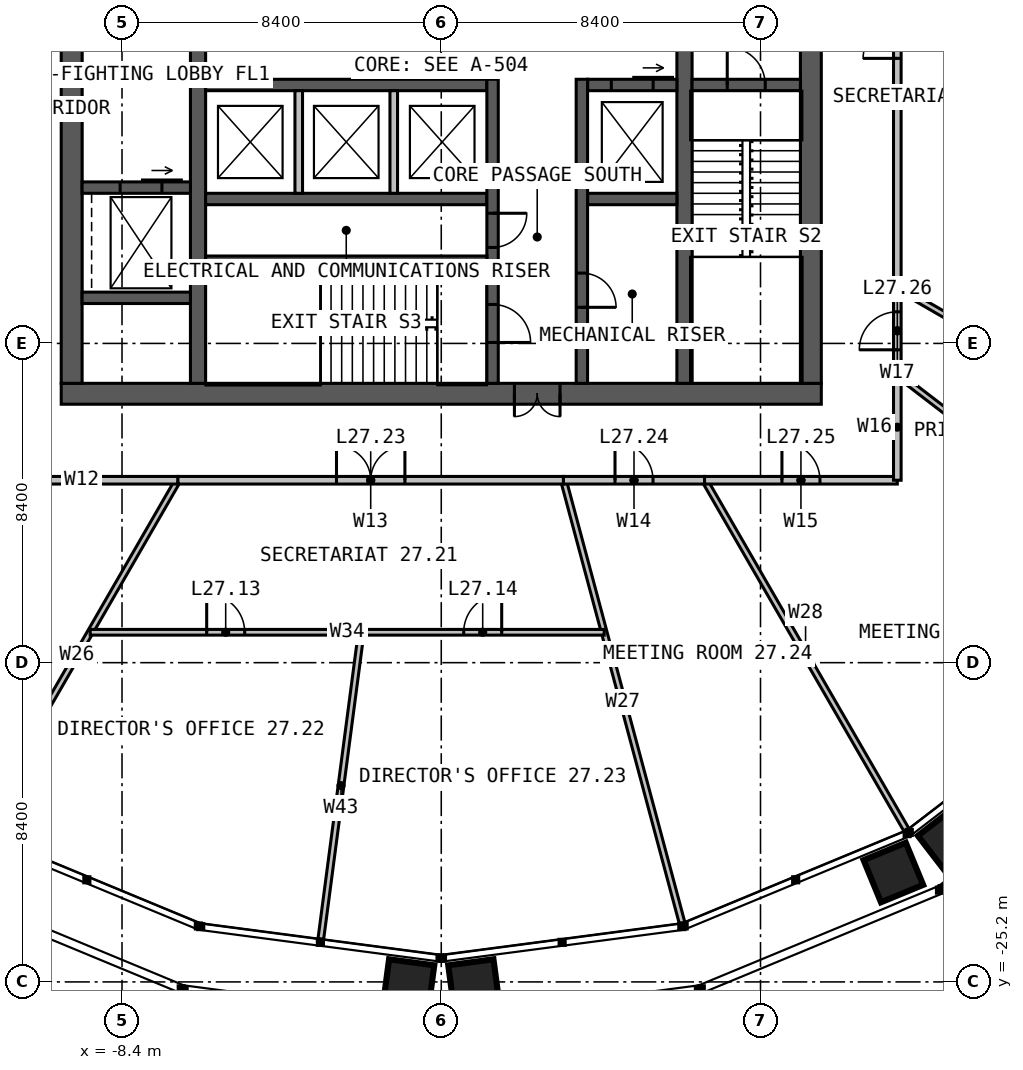
"""IFC4 building model, lengths in metres.
Left out: names, types, materials, properties, quantities, classifications, styles, units other than length and angle.
Written with IfcOpenShell. Run it as: python <this file> out.ifc"""

import sys

from ifc_helpers import new_model, si_unit, direction, frame, frame_2d, origin, place, context, subcontext, project, spatial, rectangle, extrude, element, fill, save


model = new_model("IFC4")
c1 = context("Model", 3, precision=1e-05, world=origin(), true_north=direction((0.0, 1.0)))
c2 = subcontext(c1, "Body", "Model", "MODEL_VIEW")
j1 = project(units=[si_unit("LENGTHUNIT", "METRE"), si_unit("PLANEANGLEUNIT", "RADIAN")], contexts=[c1])
p1 = place(None, origin())
s1 = spatial("IfcSite", under=j1, at=p1, CompositionType="ELEMENT")
p2 = place(p1, origin())
s2 = spatial("IfcBuilding", under=s1, at=p2, CompositionType="ELEMENT")
p3 = place(p2, frame((0.0, 0.0, 114.0)))
s3 = spatial("IfcBuildingStorey", under=s2, at=p3, CompositionType="ELEMENT", Elevation=114.0)
p4 = place(p3, frame((10.0, -9.725, 0.0), z_axis=(0.0, 0.0, 1.0), x_axis=(-1.0, 0.0, 0.0)))
e1 = element("IfcWall", 1, at=p4, inside=s3, PredefinedType="SOLIDWALL", context=c2, shape_type="SweptSolid", body=[
    extrude(rectangle(XDim=20.0, YDim=0.55, at=frame_2d((10.0, 0.0))), origin(), (0.0, 0.0, 1.0), 4.0),
])
p5 = place(p4, frame((6.875, 0.0, 0.0)))
e2 = element("IfcOpeningElement", 2, at=p5, cuts=e1, PredefinedType="OPENING", context=c2, shape_type="SweptSolid", body=[
    extrude(rectangle(XDim=1.2, YDim=2.2, at=frame_2d((0.6, 1.1))), frame((0.0, 0.285, 0.0), z_axis=(0.0, -1.0, 0.0), x_axis=(1.0, 0.0, 0.0)), (0.0, 0.0, 1.0), 0.57),
])
for number, where, z_axis, x_axis in (
    (3, (9.725, -9.45, 0.0), (0.0, 0.0, 1.0), (0.0, 1.0, 0.0)),
    (4, (-9.725, 9.45, 0.0), (0.0, 0.0, 1.0), (0.0, -1.0, 0.0)),
):
    element("IfcWall", number, at=place(p3, frame(where, z_axis=z_axis, x_axis=x_axis)), inside=s3, PredefinedType="SOLIDWALL", context=c2, shape_type="SweptSolid", body=[
        extrude(rectangle(XDim=18.9, YDim=0.55, at=frame_2d((9.45, 0.0))), origin(), (0.0, 0.0, 1.0), 4.0),
    ])
p6 = place(p3, frame((-6.4, -9.45, 0.0), z_axis=(0.0, 0.0, 1.0), x_axis=(0.0, 1.0, 0.0)))
e5 = element("IfcWall", 5, at=p6, inside=s3, PredefinedType="SOLIDWALL", context=c2, shape_type="SweptSolid", body=[
    extrude(rectangle(XDim=18.9, YDim=0.4, at=frame_2d((9.45, 0.0))), origin(), (0.0, 0.0, 1.0), 4.0),
])
p7 = place(p6, frame((8.95, 0.0, 0.0)))
e6 = element("IfcOpeningElement", 6, at=p7, cuts=e5, PredefinedType="OPENING", context=c2, shape_type="SweptSolid", body=[
    extrude(rectangle(XDim=1.0, YDim=2.2, at=frame_2d((0.5, 1.1))), frame((0.0, 0.21, 0.0), z_axis=(0.0, -1.0, 0.0), x_axis=(1.0, 0.0, 0.0)), (0.0, 0.0, 1.0), 0.42),
])
p8 = place(p3, frame((6.4, 9.45, 0.0), z_axis=(0.0, 0.0, 1.0), x_axis=(0.0, -1.0, 0.0)))
e7 = element("IfcWall", 7, at=p8, inside=s3, PredefinedType="SOLIDWALL", context=c2, shape_type="SweptSolid", body=[
    extrude(rectangle(XDim=18.9, YDim=0.4, at=frame_2d((9.45, 0.0))), origin(), (0.0, 0.0, 1.0), 4.0),
])
p9 = place(p8, frame((8.95, 0.0, 0.0)))
e8 = element("IfcOpeningElement", 8, at=p9, cuts=e7, PredefinedType="OPENING", context=c2, shape_type="SweptSolid", body=[
    extrude(rectangle(XDim=1.0, YDim=2.2, at=frame_2d((0.5, 1.1))), frame((0.0, 0.21, 0.0), z_axis=(0.0, -1.0, 0.0), x_axis=(1.0, 0.0, 0.0)), (0.0, 0.0, 1.0), 0.42),
])
p10 = place(p3, frame((-6.2, -1.6, 0.0), z_axis=(0.0, 0.0, 1.0), x_axis=(1.0, 0.0, 0.0)))
e9 = element("IfcWall", 9, at=p10, inside=s3, PredefinedType="SOLIDWALL", context=c2, shape_type="SweptSolid", body=[
    extrude(rectangle(XDim=7.4, YDim=0.3, at=frame_2d((3.7, 0.0))), origin(), (0.0, 0.0, 1.0), 4.0),
])
p11 = place(p3, frame((3.85, -1.6, 0.0), z_axis=(0.0, 0.0, 1.0), x_axis=(1.0, 0.0, 0.0)))
e10 = element("IfcWall", 10, at=p11, inside=s3, PredefinedType="SOLIDWALL", context=c2, shape_type="SweptSolid", body=[
    extrude(rectangle(XDim=2.35, YDim=0.3, at=frame_2d((1.175, 0.0))), origin(), (0.0, 0.0, 1.0), 4.0),
])
p12 = place(p11, frame((0.625, 0.0, 0.0)))
e11 = element("IfcOpeningElement", 11, at=p12, cuts=e10, PredefinedType="OPENING", context=c2, shape_type="SweptSolid", body=[
    extrude(rectangle(XDim=1.1, YDim=2.2, at=frame_2d((0.55, 1.1))), frame((0.0, 0.16, 0.0), z_axis=(0.0, -1.0, 0.0), x_axis=(1.0, 0.0, 0.0)), (0.0, 0.0, 1.0), 0.32),
])
p13 = place(p3, frame((-6.2, -4.6, 0.0), z_axis=(0.0, 0.0, 1.0), x_axis=(1.0, 0.0, 0.0)))
e12 = element("IfcWall", 12, at=p13, inside=s3, PredefinedType="SOLIDWALL", context=c2, shape_type="SweptSolid", body=[
    extrude(rectangle(XDim=7.4, YDim=0.3, at=frame_2d((3.7, 0.0))), origin(), (0.0, 0.0, 1.0), 4.0),
])
p14 = place(p3, frame((3.85, -4.6, 0.0), z_axis=(0.0, 0.0, 1.0), x_axis=(1.0, 0.0, 0.0)))
e13 = element("IfcWall", 13, at=p14, inside=s3, PredefinedType="SOLIDWALL", context=c2, shape_type="SweptSolid", body=[
    extrude(rectangle(XDim=2.35, YDim=0.3, at=frame_2d((1.175, 0.0))), origin(), (0.0, 0.0, 1.0), 4.0),
])
p15 = place(p3, frame((1.35, -1.45, 0.0), z_axis=(0.0, 0.0, 1.0), x_axis=(0.0, -1.0, 0.0)))
e14 = element("IfcWall", 14, at=p15, inside=s3, PredefinedType="SOLIDWALL", context=c2, shape_type="SweptSolid", body=[
    extrude(rectangle(XDim=8.0, YDim=0.3, at=frame_2d((4.0, 0.0))), origin(), (0.0, 0.0, 1.0), 4.0),
])
p16 = place(p15, frame((5.925, 0.0, 0.0)))
e15 = element("IfcOpeningElement", 15, at=p16, cuts=e14, PredefinedType="OPENING", context=c2, shape_type="SweptSolid", body=[
    extrude(rectangle(XDim=1.0, YDim=2.2, at=frame_2d((0.5, 1.1))), frame((0.0, 0.16, 0.0), z_axis=(0.0, -1.0, 0.0), x_axis=(1.0, 0.0, 0.0)), (0.0, 0.0, 1.0), 0.32),
])
p17 = place(p15, frame((3.525, 0.0, 0.0)))
e16 = element("IfcOpeningElement", 16, at=p17, cuts=e14, PredefinedType="OPENING", context=c2, shape_type="SweptSolid", body=[
    extrude(rectangle(XDim=0.9, YDim=2.2, at=frame_2d((0.45, 1.1))), frame((0.0, 0.16, 0.0), z_axis=(0.0, -1.0, 0.0), x_axis=(1.0, 0.0, 0.0)), (0.0, 0.0, 1.0), 0.32),
])
p18 = place(p3, frame((3.7, -1.45, 0.0), z_axis=(0.0, 0.0, 1.0), x_axis=(0.0, -1.0, 0.0)))
e17 = element("IfcWall", 17, at=p18, inside=s3, PredefinedType="SOLIDWALL", context=c2, shape_type="SweptSolid", body=[
    extrude(rectangle(XDim=8.0, YDim=0.3, at=frame_2d((4.0, 0.0))), origin(), (0.0, 0.0, 1.0), 4.0),
])
p19 = place(p18, frame((5.1, 0.0, 0.0)))
e18 = element("IfcOpeningElement", 18, at=p19, cuts=e17, PredefinedType="OPENING", context=c2, shape_type="SweptSolid", body=[
    extrude(rectangle(XDim=0.9, YDim=2.2, at=frame_2d((0.45, 1.1))), frame((0.0, 0.16, 0.0), z_axis=(0.0, -1.0, 0.0), x_axis=(1.0, 0.0, 0.0)), (0.0, 0.0, 1.0), 0.32),
])
p20 = place(p3, frame((-6.2, -6.2, 0.0), z_axis=(0.0, 0.0, 1.0), x_axis=(1.0, 0.0, 0.0)))
e19 = element("IfcWall", 19, at=p20, inside=s3, PredefinedType="SOLIDWALL", context=c2, shape_type="SweptSolid", body=[
    extrude(rectangle(XDim=7.4, YDim=0.2, at=frame_2d((3.7, 0.0))), origin(), (0.0, 0.0, 1.0), 4.0),
])
p21 = place(p3, frame((6.6, -1.6, 0.0), z_axis=(0.0, 0.0, 1.0), x_axis=(1.0, 0.0, 0.0)))
e20 = element("IfcWall", 20, at=p21, inside=s3, PredefinedType="SOLIDWALL", context=c2, shape_type="SweptSolid", body=[
    extrude(rectangle(XDim=2.85, YDim=0.3, at=frame_2d((1.425, 0.0))), origin(), (0.0, 0.0, 1.0), 4.0),
])
p22 = place(p21, frame((0.925, 0.0, 0.0)))
e21 = element("IfcOpeningElement", 21, at=p22, cuts=e20, PredefinedType="OPENING", context=c2, shape_type="SweptSolid", body=[
    extrude(rectangle(XDim=1.0, YDim=2.2, at=frame_2d((0.5, 1.1))), frame((0.0, 0.16, 0.0), z_axis=(0.0, -1.0, 0.0), x_axis=(1.0, 0.0, 0.0)), (0.0, 0.0, 1.0), 0.32),
])
p23 = place(p3, frame((-9.45, -4.3, 0.0), z_axis=(0.0, 0.0, 1.0), x_axis=(1.0, 0.0, 0.0)))
e22 = element("IfcWall", 22, at=p23, inside=s3, PredefinedType="SOLIDWALL", context=c2, shape_type="SweptSolid", body=[
    extrude(rectangle(XDim=2.85, YDim=0.3, at=frame_2d((1.425, 0.0))), origin(), (0.0, 0.0, 1.0), 4.0),
])
p24 = place(p23, frame((1.0, 0.0, 0.0)))
e23 = element("IfcOpeningElement", 23, at=p24, cuts=e22, PredefinedType="OPENING", context=c2, shape_type="SweptSolid", body=[
    extrude(rectangle(XDim=1.1, YDim=2.2, at=frame_2d((0.55, 1.1))), frame((0.0, 0.16, 0.0), z_axis=(0.0, -1.0, 0.0), x_axis=(1.0, 0.0, 0.0)), (0.0, 0.0, 1.0), 0.32),
])
p25 = place(p3, frame((-9.45, -7.2, 0.0), z_axis=(0.0, 0.0, 1.0), x_axis=(1.0, 0.0, 0.0)))
e24 = element("IfcWall", 24, at=p25, inside=s3, PredefinedType="SOLIDWALL", context=c2, shape_type="SweptSolid", body=[
    extrude(rectangle(XDim=2.85, YDim=0.3, at=frame_2d((1.425, 0.0))), origin(), (0.0, 0.0, 1.0), 4.0),
])
for number, where, z_axis, x_axis in (
    (25, (-3.75, -1.75, 0.0), (0.0, 0.0, 1.0), (0.0, -1.0, 0.0)),
    (26, (-1.25, -1.75, 0.0), (0.0, 0.0, 1.0), (0.0, -1.0, 0.0)),
):
    element("IfcWall", number, at=place(p3, frame(where, z_axis=z_axis, x_axis=x_axis)), inside=s3, PredefinedType="SOLIDWALL", context=c2, shape_type="SweptSolid", body=[
        extrude(rectangle(XDim=2.7, YDim=0.2, at=frame_2d((1.35, 0.0))), origin(), (0.0, 0.0, 1.0), 3.75),
    ])
for number, where, z_axis, x_axis in (
    (27, (12.0, -6.928, 0.0), (0.0, 0.0, 1.0), (0.866, -0.5, 0.0)),
    (28, (-6.928, -12.0, 0.0), (0.0, 0.0, 1.0), (-0.5, -0.866, 0.0)),
):
    element("IfcWall", number, at=place(p3, frame(where, z_axis=z_axis, x_axis=x_axis)), inside=s3, PredefinedType="PARTITIONING", context=c2, shape_type="SweptSolid", body=[
        extrude(rectangle(XDim=10.631, YDim=0.15, at=frame_2d((5.315, 0.0))), origin(), (0.0, 0.0, 1.0), 2.79),
    ])
p26 = place(p3, frame((3.215, -12.0, 0.0), z_axis=(0.0, 0.0, 1.0), x_axis=(0.258814986396, -0.965926913807, 0.0)))
e29 = element("IfcWall", 29, at=p26, inside=s3, PredefinedType="PARTITIONING", context=c2, shape_type="SweptSolid", body=[
    extrude(rectangle(XDim=12.064, YDim=0.15, at=frame_2d((6.032, 0.0))), origin(), (0.0, 0.0, 1.0), 2.79),
])
p27 = place(p3, frame((6.928, -12.0, 0.0), z_axis=(0.0, 0.0, 1.0), x_axis=(0.500002090115, -0.866024197053, 0.0)))
e30 = element("IfcWall", 30, at=p27, inside=s3, PredefinedType="PARTITIONING", context=c2, shape_type="SweptSolid", body=[
    extrude(rectangle(XDim=10.631, YDim=0.15, at=frame_2d((5.315, 0.0))), origin(), (0.0, 0.0, 1.0), 2.79),
])
p28 = place(p3, frame((12.0, -9.208, 0.0), z_axis=(0.0, 0.0, 1.0), x_axis=(0.793357264949, -0.608756314261, 0.0)))
e31 = element("IfcWall", 31, at=p28, inside=s3, PredefinedType="PARTITIONING", context=c2, shape_type="SweptSolid", body=[
    extrude(rectangle(XDim=9.152, YDim=0.15, at=frame_2d((4.576, 0.0))), origin(), (0.0, 0.0, 1.0), 2.79),
])
p29 = place(p3, frame((12.0, -6.928, 0.0), z_axis=(0.0, 0.0, 1.0), x_axis=(0.0, 1.0, 0.0)))
e32 = element("IfcWall", 32, at=p29, inside=s3, PredefinedType="PARTITIONING", context=c2, shape_type="SweptSolid", body=[
    extrude(rectangle(XDim=13.856, YDim=0.2, at=frame_2d((6.928, 0.0))), origin(), (0.0, 0.0, 1.0), 3.8),
])
p30 = place(p29, frame((6.028, 0.0, 0.0)))
e33 = element("IfcOpeningElement", 33, at=p30, cuts=e32, PredefinedType="OPENING", context=c2, shape_type="SweptSolid", body=[
    extrude(rectangle(XDim=1.8, YDim=2.2, at=frame_2d((0.9, 1.1))), frame((0.0, 0.11, 0.0), z_axis=(0.0, -1.0, 0.0), x_axis=(1.0, 0.0, 0.0)), (0.0, 0.0, 1.0), 0.22),
])
p31 = place(p3, frame((-12.0, -12.0, 0.0), z_axis=(0.0, 0.0, 1.0), x_axis=(1.0, 0.0, 0.0)))
e34 = element("IfcWall", 34, at=p31, inside=s3, PredefinedType="PARTITIONING", context=c2, shape_type="SweptSolid", body=[
    extrude(rectangle(XDim=5.072, YDim=0.2, at=frame_2d((2.536, 0.0))), origin(), (0.0, 0.0, 1.0), 3.8),
])
p32 = place(p3, frame((-9.238, -16.0, 0.0), z_axis=(0.0, 0.0, 1.0), x_axis=(1.0, 0.0, 0.0)))
e35 = element("IfcWall", 35, at=p32, inside=s3, PredefinedType="PARTITIONING", context=c2, shape_type="SweptSolid", body=[
    extrude(rectangle(XDim=13.525, YDim=0.15, at=frame_2d((6.762, 0.0))), origin(), (0.0, 0.0, 1.0), 2.79),
])
p33 = place(p32, frame((3.066, 0.0, 0.0)))
e36 = element("IfcOpeningElement", 36, at=p33, cuts=e35, PredefinedType="OPENING", context=c2, shape_type="SweptSolid", body=[
    extrude(rectangle(XDim=1.0, YDim=2.2, at=frame_2d((0.5, 1.1))), frame((0.0, 0.085, 0.0), z_axis=(0.0, -1.0, 0.0), x_axis=(1.0, 0.0, 0.0)), (0.0, 0.0, 1.0), 0.17),
])
p34 = place(p32, frame((9.828, 0.0, 0.0)))
e37 = element("IfcOpeningElement", 37, at=p34, cuts=e35, PredefinedType="OPENING", context=c2, shape_type="SweptSolid", body=[
    extrude(rectangle(XDim=1.0, YDim=2.2, at=frame_2d((0.5, 1.1))), frame((0.0, 0.085, 0.0), z_axis=(0.0, -1.0, 0.0), x_axis=(1.0, 0.0, 0.0)), (0.0, 0.0, 1.0), 0.17),
])
p35 = place(p3, frame((-2.106, -16.0, 0.0), z_axis=(0.0, 0.0, 1.0), x_axis=(-0.13053287573, -0.99144398145, 0.0)))
e38 = element("IfcWall", 38, at=p35, inside=s3, PredefinedType="PARTITIONING", context=c2, shape_type="SweptSolid", body=[
    extrude(rectangle(XDim=8.14, YDim=0.15, at=frame_2d((4.07, 0.0))), origin(), (0.0, 0.0, 1.0), 2.79),
])
p36 = place(p3, frame((-6.928, -12.0, 0.0), z_axis=(0.0, 0.0, 1.0), x_axis=(1.0, 0.0, 0.0)))
e39 = element("IfcWall", 39, at=p36, inside=s3, PredefinedType="PARTITIONING", context=c2, shape_type="SweptSolid", body=[
    extrude(rectangle(XDim=10.144, YDim=0.2, at=frame_2d((5.072, 0.0))), origin(), (0.0, 0.0, 1.0), 3.8),
])
p37 = place(p36, frame((4.172, 0.0, 0.0)))
e40 = element("IfcOpeningElement", 40, at=p37, cuts=e39, PredefinedType="OPENING", context=c2, shape_type="SweptSolid", body=[
    extrude(rectangle(XDim=1.8, YDim=2.2, at=frame_2d((0.9, 1.1))), frame((0.0, 0.11, 0.0), z_axis=(0.0, -1.0, 0.0), x_axis=(1.0, 0.0, 0.0)), (0.0, 0.0, 1.0), 0.22),
])
p38 = place(p3, frame((3.215, -12.0, 0.0), z_axis=(0.0, 0.0, 1.0), x_axis=(1.0, 0.0, 0.0)))
e41 = element("IfcWall", 41, at=p38, inside=s3, PredefinedType="PARTITIONING", context=c2, shape_type="SweptSolid", body=[
    extrude(rectangle(XDim=3.713, YDim=0.2, at=frame_2d((1.856, 0.0))), origin(), (0.0, 0.0, 1.0), 3.8),
])
p39 = place(p38, frame((1.356, 0.0, 0.0)))
e42 = element("IfcOpeningElement", 42, at=p39, cuts=e41, PredefinedType="OPENING", context=c2, shape_type="SweptSolid", body=[
    extrude(rectangle(XDim=1.0, YDim=2.2, at=frame_2d((0.5, 1.1))), frame((0.0, 0.11, 0.0), z_axis=(0.0, -1.0, 0.0), x_axis=(1.0, 0.0, 0.0)), (0.0, 0.0, 1.0), 0.22),
])
p40 = place(p3, frame((6.928, -12.0, 0.0), z_axis=(0.0, 0.0, 1.0), x_axis=(1.0, 0.0, 0.0)))
e43 = element("IfcWall", 43, at=p40, inside=s3, PredefinedType="PARTITIONING", context=c2, shape_type="SweptSolid", body=[
    extrude(rectangle(XDim=5.072, YDim=0.2, at=frame_2d((2.536, 0.0))), origin(), (0.0, 0.0, 1.0), 3.8),
])
p41 = place(p40, frame((2.036, 0.0, 0.0)))
e44 = element("IfcOpeningElement", 44, at=p41, cuts=e43, PredefinedType="OPENING", context=c2, shape_type="SweptSolid", body=[
    extrude(rectangle(XDim=1.0, YDim=2.2, at=frame_2d((0.5, 1.1))), frame((0.0, 0.11, 0.0), z_axis=(0.0, -1.0, 0.0), x_axis=(1.0, 0.0, 0.0)), (0.0, 0.0, 1.0), 0.22),
])
p42 = place(p3, frame((12.0, -12.0, 0.0), z_axis=(0.0, 0.0, 1.0), x_axis=(0.0, 1.0, 0.0)))
e45 = element("IfcWall", 45, at=p42, inside=s3, PredefinedType="PARTITIONING", context=c2, shape_type="SweptSolid", body=[
    extrude(rectangle(XDim=2.792, YDim=0.2, at=frame_2d((1.396, 0.0))), origin(), (0.0, 0.0, 1.0), 3.8),
])
p43 = place(p3, frame((12.0, -9.208, 0.0), z_axis=(0.0, 0.0, 1.0), x_axis=(0.0, 1.0, 0.0)))
e46 = element("IfcWall", 46, at=p43, inside=s3, PredefinedType="PARTITIONING", context=c2, shape_type="SweptSolid", body=[
    extrude(rectangle(XDim=2.28, YDim=0.2, at=frame_2d((1.14, 0.0))), origin(), (0.0, 0.0, 1.0), 3.8),
])
p44 = place(p43, frame((0.64, 0.0, 0.0)))
e47 = element("IfcOpeningElement", 47, at=p44, cuts=e46, PredefinedType="OPENING", context=c2, shape_type="SweptSolid", body=[
    extrude(rectangle(XDim=1.0, YDim=2.2, at=frame_2d((0.5, 1.1))), frame((0.0, 0.11, 0.0), z_axis=(0.0, -1.0, 0.0), x_axis=(1.0, 0.0, 0.0)), (0.0, 0.0, 1.0), 0.22),
])
p45 = place(p5, origin())
e48 = element("IfcDoor", 48, at=p45, inside=s3, OperationType="DOUBLE_DOOR_SINGLE_SWING", PredefinedType="DOOR", context=c2, shape_type="SweptSolid", body=[
    extrude(rectangle(XDim=1.2, YDim=2.2, at=frame_2d((0.6, 1.1))), frame((0.0, 0.025, 0.0), z_axis=(0.0, -1.0, 0.0), x_axis=(1.0, 0.0, 0.0)), (0.0, 0.0, 1.0), 0.05),
])
fill(e2, e48)
p46 = place(p22, origin())
e49 = element("IfcDoor", 49, at=p46, inside=s3, OperationType="SINGLE_SWING_LEFT", PredefinedType="DOOR", context=c2, shape_type="SweptSolid", body=[
    extrude(rectangle(XDim=1.0, YDim=2.2, at=frame_2d((0.5, 1.1))), frame((0.0, 0.025, 0.0), z_axis=(0.0, -1.0, 0.0), x_axis=(1.0, 0.0, 0.0)), (0.0, 0.0, 1.0), 0.05),
])
fill(e21, e49)
p47 = place(p16, origin())
e50 = element("IfcDoor", 50, at=p47, inside=s3, OperationType="SINGLE_SWING_RIGHT", PredefinedType="DOOR", context=c2, shape_type="SweptSolid", body=[
    extrude(rectangle(XDim=1.0, YDim=2.2, at=frame_2d((0.5, 1.1))), frame((0.0, 0.025, 0.0), z_axis=(0.0, -1.0, 0.0), x_axis=(1.0, 0.0, 0.0)), (0.0, 0.0, 1.0), 0.05),
])
fill(e15, e50)
p48 = place(p17, origin())
e51 = element("IfcDoor", 51, at=p48, inside=s3, OperationType="SINGLE_SWING_LEFT", PredefinedType="DOOR", context=c2, shape_type="SweptSolid", body=[
    extrude(rectangle(XDim=0.9, YDim=2.2, at=frame_2d((0.45, 1.1))), frame((0.0, 0.025, 0.0), z_axis=(0.0, -1.0, 0.0), x_axis=(1.0, 0.0, 0.0)), (0.0, 0.0, 1.0), 0.05),
])
fill(e16, e51)
p49 = place(p19, origin())
e52 = element("IfcDoor", 52, at=p49, inside=s3, OperationType="SINGLE_SWING_RIGHT", PredefinedType="DOOR", context=c2, shape_type="SweptSolid", body=[
    extrude(rectangle(XDim=0.9, YDim=2.2, at=frame_2d((0.45, 1.1))), frame((0.0, 0.025, 0.0), z_axis=(0.0, -1.0, 0.0), x_axis=(1.0, 0.0, 0.0)), (0.0, 0.0, 1.0), 0.05),
])
fill(e18, e52)
p50 = place(p12, origin())
e53 = element("IfcDoor", 53, at=p50, inside=s3, OperationType="SLIDING_TO_LEFT", PredefinedType="DOOR", context=c2, shape_type="SweptSolid", body=[
    extrude(rectangle(XDim=1.1, YDim=2.2, at=frame_2d((0.55, 1.1))), frame((0.0, 0.025, 0.0), z_axis=(0.0, -1.0, 0.0), x_axis=(1.0, 0.0, 0.0)), (0.0, 0.0, 1.0), 0.05),
])
fill(e11, e53)
p51 = place(p24, origin())
e54 = element("IfcDoor", 54, at=p51, inside=s3, OperationType="SLIDING_TO_LEFT", PredefinedType="DOOR", context=c2, shape_type="SweptSolid", body=[
    extrude(rectangle(XDim=1.1, YDim=2.2, at=frame_2d((0.55, 1.1))), frame((0.0, 0.025, 0.0), z_axis=(0.0, -1.0, 0.0), x_axis=(1.0, 0.0, 0.0)), (0.0, 0.0, 1.0), 0.05),
])
fill(e23, e54)
p52 = place(p30, origin())
e55 = element("IfcDoor", 55, at=p52, inside=s3, OperationType="DOUBLE_DOOR_SINGLE_SWING", PredefinedType="DOOR", context=c2, shape_type="SweptSolid", body=[
    extrude(rectangle(XDim=1.8, YDim=2.2, at=frame_2d((0.9, 1.1))), frame((0.0, 0.025, 0.0), z_axis=(0.0, -1.0, 0.0), x_axis=(1.0, 0.0, 0.0)), (0.0, 0.0, 1.0), 0.05),
])
fill(e33, e55)
p53 = place(p33, origin())
e56 = element("IfcDoor", 56, at=p53, inside=s3, OperationType="SINGLE_SWING_LEFT", PredefinedType="DOOR", context=c2, shape_type="SweptSolid", body=[
    extrude(rectangle(XDim=1.0, YDim=2.2, at=frame_2d((0.5, 1.1))), frame((0.0, 0.025, 0.0), z_axis=(0.0, -1.0, 0.0), x_axis=(1.0, 0.0, 0.0)), (0.0, 0.0, 1.0), 0.05),
])
fill(e36, e56)
p54 = place(p34, origin())
e57 = element("IfcDoor", 57, at=p54, inside=s3, OperationType="SINGLE_SWING_RIGHT", PredefinedType="DOOR", context=c2, shape_type="SweptSolid", body=[
    extrude(rectangle(XDim=1.0, YDim=2.2, at=frame_2d((0.5, 1.1))), frame((0.0, 0.025, 0.0), z_axis=(0.0, -1.0, 0.0), x_axis=(1.0, 0.0, 0.0)), (0.0, 0.0, 1.0), 0.05),
])
fill(e37, e57)
p55 = place(p37, origin())
e58 = element("IfcDoor", 58, at=p55, inside=s3, OperationType="DOUBLE_DOOR_SINGLE_SWING", PredefinedType="DOOR", context=c2, shape_type="SweptSolid", body=[
    extrude(rectangle(XDim=1.8, YDim=2.2, at=frame_2d((0.9, 1.1))), frame((0.0, 0.025, 0.0), z_axis=(0.0, -1.0, 0.0), x_axis=(1.0, 0.0, 0.0)), (0.0, 0.0, 1.0), 0.05),
])
fill(e40, e58)
p56 = place(p39, origin())
e59 = element("IfcDoor", 59, at=p56, inside=s3, OperationType="SINGLE_SWING_LEFT", PredefinedType="DOOR", context=c2, shape_type="SweptSolid", body=[
    extrude(rectangle(XDim=1.0, YDim=2.2, at=frame_2d((0.5, 1.1))), frame((0.0, 0.025, 0.0), z_axis=(0.0, -1.0, 0.0), x_axis=(1.0, 0.0, 0.0)), (0.0, 0.0, 1.0), 0.05),
])
fill(e42, e59)
p57 = place(p41, origin())
e60 = element("IfcDoor", 60, at=p57, inside=s3, OperationType="SINGLE_SWING_LEFT", PredefinedType="DOOR", context=c2, shape_type="SweptSolid", body=[
    extrude(rectangle(XDim=1.0, YDim=2.2, at=frame_2d((0.5, 1.1))), frame((0.0, 0.025, 0.0), z_axis=(0.0, -1.0, 0.0), x_axis=(1.0, 0.0, 0.0)), (0.0, 0.0, 1.0), 0.05),
])
fill(e44, e60)
p58 = place(p44, origin())
e61 = element("IfcDoor", 61, at=p58, inside=s3, OperationType="SINGLE_SWING_LEFT", PredefinedType="DOOR", context=c2, shape_type="SweptSolid", body=[
    extrude(rectangle(XDim=1.0, YDim=2.2, at=frame_2d((0.5, 1.1))), frame((0.0, 0.025, 0.0), z_axis=(0.0, -1.0, 0.0), x_axis=(1.0, 0.0, 0.0)), (0.0, 0.0, 1.0), 0.05),
])
fill(e47, e61)
save(model, sys.argv[1])
